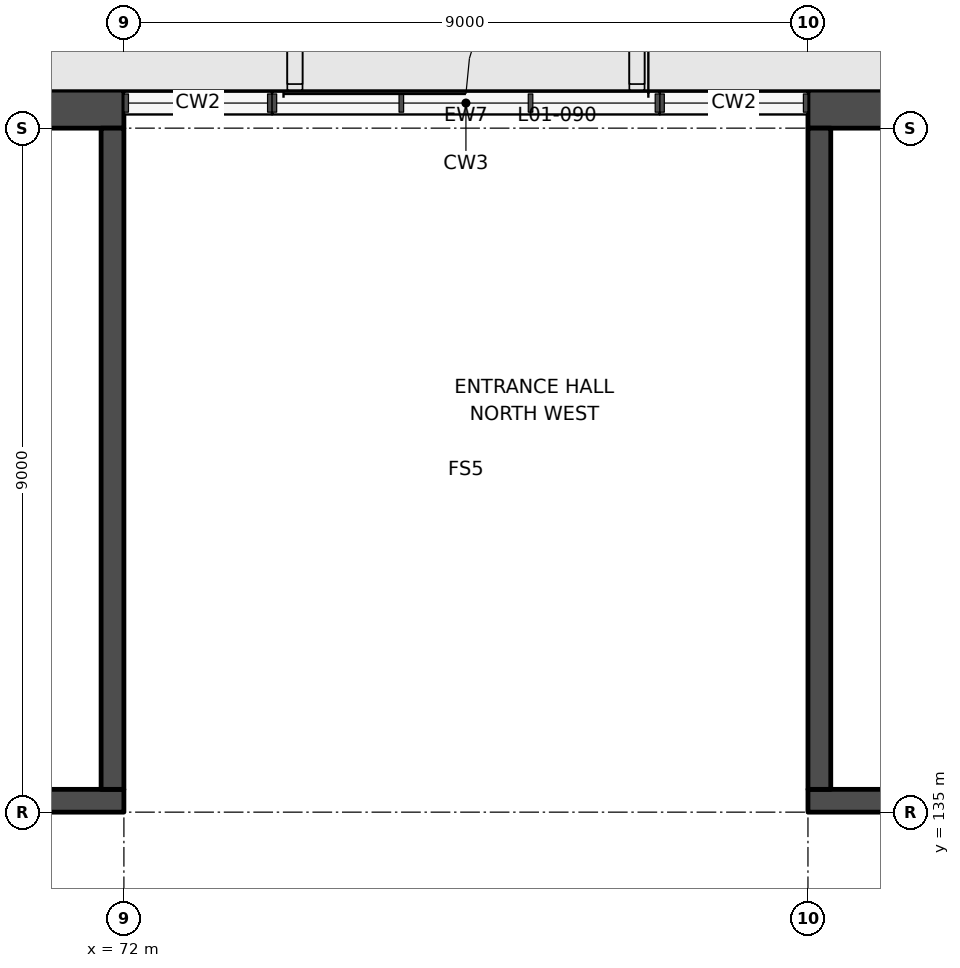
"""IFC4 building model, lengths in metres.
Left out: names, types, materials, properties, quantities, classifications, styles, units other than length and angle.
Written with IfcOpenShell. Run it as: python <this file> out.ifc"""

import sys

from ifc_helpers import new_model, si_unit, direction, frame, frame_2d, origin, place, context, subcontext, project, spatial, rectangle, extrude, element, fill, save


model = new_model("IFC4")
c1 = context("Model", 3, precision=1e-05, world=origin(), true_north=direction((0.0, 1.0)))
c2 = subcontext(c1, "Body", "Model", "MODEL_VIEW")
j1 = project(units=[si_unit("LENGTHUNIT", "METRE"), si_unit("PLANEANGLEUNIT", "RADIAN")], contexts=[c1])
p1 = place(None, origin())
s1 = spatial("IfcSite", under=j1, at=p1, CompositionType="ELEMENT")
p2 = place(p1, origin())
s2 = spatial("IfcBuilding", under=s1, at=p2, CompositionType="ELEMENT")
p3 = place(p2, frame((0.0, 0.0, 7.0)))
s3 = spatial("IfcBuildingStorey", under=s2, at=p3, CompositionType="ELEMENT", Elevation=7.0)
p4 = place(p3, frame((79.05, 144.45, 0.0), z_axis=(0.0, 0.0, 1.0), x_axis=(-1.0, 0.0, 0.0)))
e1 = element("IfcWall", 1, at=p4, inside=s3, PredefinedType="SOLIDWALL", context=c2, shape_type="SweptSolid", body=[
    extrude(rectangle(XDim=5.1, YDim=0.1, at=frame_2d((2.55, 0.0))), origin(), (0.0, 0.0, 1.0), 3.1),
])
p5 = place(p4, frame((0.15, 0.0, 0.0)))
e2 = element("IfcOpeningElement", 2, at=p5, cuts=e1, PredefinedType="OPENING", context=c2, shape_type="SweptSolid", body=[
    extrude(rectangle(XDim=4.8, YDim=2.7, at=frame_2d((2.4, 1.35))), frame((0.0, 0.06, 0.0), z_axis=(0.0, -1.0, 0.0), x_axis=(1.0, 0.0, 0.0)), (0.0, 0.0, 1.0), 0.12),
])
p6 = place(p3, frame((81.0, 135.15, 0.0), z_axis=(0.0, 0.0, 1.0), x_axis=(1.0, 0.0, 0.0)))
e3 = element("IfcWall", 3, at=p6, inside=s3, PredefinedType="SHEAR", context=c2, shape_type="SweptSolid", body=[
    extrude(rectangle(XDim=18.0, YDim=0.3, at=frame_2d((9.0, 0.0))), origin(), (0.0, 0.0, 1.0), 4.5),
])
p7 = place(p6, frame((8.6, 0.0, 0.0)))
e4 = element("IfcOpeningElement", 4, at=p7, cuts=e3, PredefinedType="OPENING", context=c2, shape_type="SweptSolid", body=[
    extrude(rectangle(XDim=1.2, YDim=2.1, at=frame_2d((0.6, 1.05))), frame((0.0, 0.16, 0.0), z_axis=(0.0, -1.0, 0.0), x_axis=(1.0, 0.0, 0.0)), (0.0, 0.0, 1.0), 0.32),
])
p8 = place(p3, frame((81.0, 144.25, 0.0), z_axis=(0.0, 0.0, 1.0), x_axis=(1.0, 0.0, 0.0)))
e5 = element("IfcWall", 5, at=p8, inside=s3, PredefinedType="SHEAR", context=c2, shape_type="SweptSolid", body=[
    extrude(rectangle(XDim=18.0, YDim=0.5, at=frame_2d((9.0, 0.0))), origin(), (0.0, 0.0, 1.0), 4.5),
])
p9 = place(p3, frame((81.15, 135.3, 0.0), z_axis=(0.0, 0.0, 1.0), x_axis=(0.0, 1.0, 0.0)))
e6 = element("IfcWall", 6, at=p9, inside=s3, PredefinedType="SHEAR", context=c2, shape_type="SweptSolid", body=[
    extrude(rectangle(XDim=8.7, YDim=0.3, at=frame_2d((4.35, 0.0))), origin(), (0.0, 0.0, 1.0), 4.5),
])
p10 = place(p3, frame((72.0, 135.15, 0.0), z_axis=(0.0, 0.0, 1.0), x_axis=(-1.0, 0.0, 0.0)))
e7 = element("IfcWall", 7, at=p10, inside=s3, PredefinedType="SHEAR", context=c2, shape_type="SweptSolid", body=[
    extrude(rectangle(XDim=18.25, YDim=0.3, at=frame_2d((9.125, 0.0))), origin(), (0.0, 0.0, 1.0), 4.5),
])
p11 = place(p10, frame((8.6, 0.0, 0.0)))
e8 = element("IfcOpeningElement", 8, at=p11, cuts=e7, PredefinedType="OPENING", context=c2, shape_type="SweptSolid", body=[
    extrude(rectangle(XDim=1.2, YDim=2.1, at=frame_2d((0.6, 1.05))), frame((0.0, 0.16, 0.0), z_axis=(0.0, -1.0, 0.0), x_axis=(1.0, 0.0, 0.0)), (0.0, 0.0, 1.0), 0.32),
])
p12 = place(p3, frame((72.0, 144.25, 0.0), z_axis=(0.0, 0.0, 1.0), x_axis=(-1.0, 0.0, 0.0)))
e9 = element("IfcWall", 9, at=p12, inside=s3, PredefinedType="SHEAR", context=c2, shape_type="SweptSolid", body=[
    extrude(rectangle(XDim=18.0, YDim=0.5, at=frame_2d((9.0, 0.0))), origin(), (0.0, 0.0, 1.0), 4.5),
])
p13 = place(p3, frame((71.85, 135.3, 0.0), z_axis=(0.0, 0.0, 1.0), x_axis=(0.0, 1.0, 0.0)))
e10 = element("IfcWall", 10, at=p13, inside=s3, PredefinedType="SHEAR", context=c2, shape_type="SweptSolid", body=[
    extrude(rectangle(XDim=8.7, YDim=0.3, at=frame_2d((4.35, 0.0))), origin(), (0.0, 0.0, 1.0), 4.5),
])
p14 = place(p5, frame((4.8, 0.0, 0.0), z_axis=(0.0, 0.0, 1.0), x_axis=(-1.0, 0.0, 0.0)))
e11 = element("IfcDoor", 11, at=p14, inside=s3, OperationType="DOUBLE_DOOR_SINGLE_SWING", PredefinedType="DOOR", context=c2, shape_type="SweptSolid", body=[
    extrude(rectangle(XDim=4.8, YDim=2.7, at=frame_2d((2.4, 1.35))), frame((0.0, 0.025, 0.0), z_axis=(0.0, -1.0, 0.0), x_axis=(1.0, 0.0, 0.0)), (0.0, 0.0, 1.0), 0.05),
])
fill(e2, e11)
save(model, sys.argv[1])
